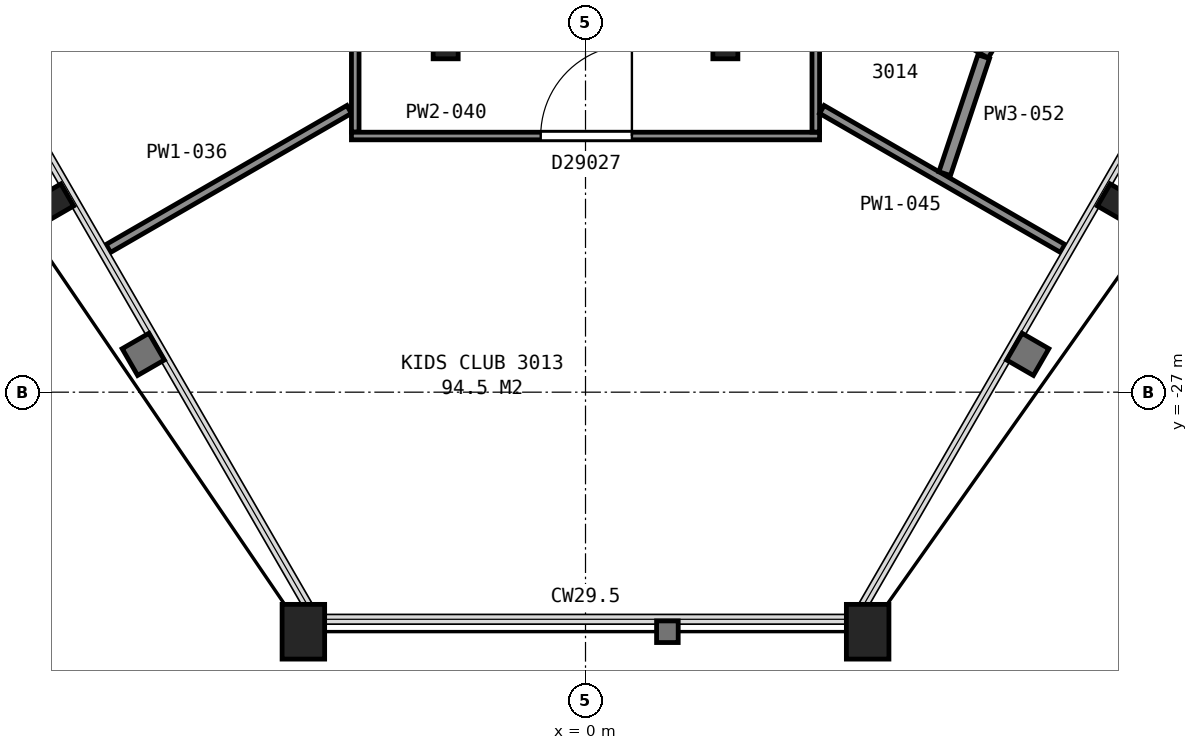
"""IFC4 building model, lengths in metres.
Left out: names, types, materials, properties, quantities, classifications, styles, units other than length and angle.
Written with IfcOpenShell. Run it as: python <this file> out.ifc"""

import sys

from ifc_helpers import new_model, si_unit, direction, frame, frame_2d, origin, origin_2d, place, context, subcontext, project, spatial, rectangle, hollow_rectangle, i_section, extrude, element, fill, save


model = new_model("IFC4")
c1 = context("Model", 3, precision=1e-05, world=origin(), true_north=direction((0.0, 1.0)))
c2 = subcontext(c1, "Body", "Model", "MODEL_VIEW")
j1 = project(units=[si_unit("LENGTHUNIT", "METRE"), si_unit("PLANEANGLEUNIT", "RADIAN")], contexts=[c1])
p1 = place(None, origin())
s1 = spatial("IfcSite", under=j1, at=p1, CompositionType="ELEMENT")
p2 = place(p1, origin())
s2 = spatial("IfcBuilding", under=s1, at=p2, CompositionType="ELEMENT")
p3 = place(p2, frame((0.0, 0.0, 125.2)))
s3 = spatial("IfcBuildingStorey", under=s2, at=p3, CompositionType="ELEMENT", Elevation=125.2)
p4 = place(p3, frame((-8.72, -23.87, 0.0), z_axis=(0.0, 0.0, 1.0), x_axis=(-0.5, 0.866025403784, 0.0)))
e1 = element("IfcColumn", 1, at=p4, inside=s3, PredefinedType="COLUMN", context=c2, shape_type="SweptSolid", body=[
    extrude(i_section(OverallWidth=0.419, OverallDepth=0.455, WebThickness=0.042, FlangeThickness=0.068, FilletRadius=0.015, at=origin_2d()), origin(), (0.0, 0.0, 1.0), 3.56),
])
for number, where, z_axis, x_axis in (
    (2, (-4.64, -30.94, 0.0), (0.0, 0.0, 1.0), (-1.0, 0.0, 0.0)),
    (3, (4.64, -30.94, 0.0), (0.0, 0.0, 1.0), (-1.0, 0.0, 0.0)),
):
    element("IfcColumn", number, at=place(p3, frame(where, z_axis=z_axis, x_axis=x_axis)), inside=s3, PredefinedType="COLUMN", context=c2, shape_type="SweptSolid", body=[
        extrude(hollow_rectangle(XDim=0.7, YDim=0.9, WallThickness=0.065, at=origin_2d()), origin(), (0.0, 0.0, 1.0), 3.525),
    ])
p5 = place(p3, frame((8.72, -23.87, 0.0), z_axis=(0.0, 0.0, 1.0), x_axis=(-0.5, -0.866025403784, 0.0)))
e4 = element("IfcColumn", 4, at=p5, inside=s3, PredefinedType="COLUMN", context=c2, shape_type="SweptSolid", body=[
    extrude(i_section(OverallWidth=0.419, OverallDepth=0.455, WebThickness=0.042, FlangeThickness=0.068, FilletRadius=0.015, at=origin_2d()), origin(), (0.0, 0.0, 1.0), 3.56),
])
for number, where, z_axis, x_axis in (
    (5, (-2.3, -21.3, 0.0), (0.0, 0.0, 1.0), (-1.0, 0.0, 0.0)),
    (6, (2.3, -21.3, 0.0), (0.0, 0.0, 1.0), (-1.0, 0.0, 0.0)),
):
    element("IfcColumn", number, at=place(p3, frame(where, z_axis=z_axis, x_axis=x_axis)), inside=s3, PredefinedType="COLUMN", context=c2, shape_type="SweptSolid", body=[
        extrude(i_section(OverallWidth=0.411, OverallDepth=0.434, WebThickness=0.036, FlangeThickness=0.057, FilletRadius=0.015, at=origin_2d()), origin(), (0.0, 0.0, 1.0), 3.6),
    ])
p6 = place(p3, frame((-7.848, -24.636, 0.0), z_axis=(0.0, 0.0, 1.0), x_axis=(0.866046917185, 0.499962735845, 0.0)))
e7 = element("IfcWall", 7, at=p6, inside=s3, PredefinedType="PARTITIONING", context=c2, shape_type="SweptSolid", body=[
    extrude(rectangle(XDim=4.573, YDim=0.15, at=frame_2d((2.287, 0.0))), origin(), (0.0, 0.0, 1.0), 2.613),
])
p7 = place(p3, frame((-3.787, -22.722, 0.0), z_axis=(0.0, 0.0, 1.0), x_axis=(0.0, 1.0, 0.0)))
e8 = element("IfcWall", 8, at=p7, inside=s3, PredefinedType="PARTITIONING", context=c2, shape_type="SweptSolid", body=[
    extrude(rectangle(XDim=7.197, YDim=0.125, at=frame_2d((3.599, 0.0))), origin(), (0.0, 0.0, 1.0), 2.613),
])
p8 = place(p7, frame((2.58, 0.0, 0.0)))
e9 = element("IfcOpeningElement", 9, at=p8, cuts=e8, PredefinedType="OPENING", context=c2, shape_type="SweptSolid", body=[
    extrude(rectangle(XDim=1.0, YDim=2.1, at=frame_2d((0.5, 1.05))), frame((0.0, 0.073, 0.0), z_axis=(0.0, -1.0, 0.0), x_axis=(1.0, 0.0, 0.0)), (0.0, 0.0, 1.0), 0.145),
])
p9 = place(p3, frame((3.85, -22.787, 0.0), z_axis=(0.0, 0.0, 1.0), x_axis=(-1.0, 0.0, 0.0)))
e10 = element("IfcWall", 10, at=p9, inside=s3, PredefinedType="PARTITIONING", context=c2, shape_type="SweptSolid", body=[
    extrude(rectangle(XDim=7.699, YDim=0.125, at=frame_2d((3.85, 0.0))), origin(), (0.0, 0.0, 1.0), 2.613),
])
p10 = place(p9, frame((3.086, 0.0, 0.0)))
e11 = element("IfcOpeningElement", 11, at=p10, cuts=e10, PredefinedType="OPENING", context=c2, shape_type="SweptSolid", body=[
    extrude(rectangle(XDim=1.5, YDim=2.1, at=frame_2d((0.75, 1.05))), frame((0.0, 0.073, 0.0), z_axis=(0.0, -1.0, 0.0), x_axis=(1.0, 0.0, 0.0)), (0.0, 0.0, 1.0), 0.145),
])
p11 = place(p3, frame((3.787, -15.525, 0.0), z_axis=(0.0, 0.0, 1.0), x_axis=(0.0, -1.0, 0.0)))
e12 = element("IfcWall", 12, at=p11, inside=s3, PredefinedType="PARTITIONING", context=c2, shape_type="SweptSolid", body=[
    extrude(rectangle(XDim=7.197, YDim=0.125, at=frame_2d((3.599, 0.0))), origin(), (0.0, 0.0, 1.0), 2.613),
])
p12 = place(p11, frame((2.177, 0.0, 0.0)))
e13 = element("IfcOpeningElement", 13, at=p12, cuts=e12, PredefinedType="OPENING", context=c2, shape_type="SweptSolid", body=[
    extrude(rectangle(XDim=0.9, YDim=2.1, at=frame_2d((0.45, 1.05))), frame((0.0, 0.073, 0.0), z_axis=(0.0, -1.0, 0.0), x_axis=(1.0, 0.0, 0.0)), (0.0, 0.0, 1.0), 0.145),
])
p13 = place(p3, frame((3.887, -22.35, 0.0), z_axis=(0.0, 0.0, 1.0), x_axis=(0.866046917185, -0.499962735845, 0.0)))
e14 = element("IfcWall", 14, at=p13, inside=s3, PredefinedType="PARTITIONING", context=c2, shape_type="SweptSolid", body=[
    extrude(rectangle(XDim=4.573, YDim=0.15, at=frame_2d((2.287, 0.0))), origin(), (0.0, 0.0, 1.0), 2.613),
])
p14 = place(p3, frame((6.674, -21.418, 0.0), z_axis=(0.0, 0.0, 1.0), x_axis=(-0.866105631149, 0.499861016376, 0.0)))
e15 = element("IfcWall", 15, at=p14, inside=s3, PredefinedType="PARTITIONING", context=c2, shape_type="SweptSolid", body=[
    extrude(rectangle(XDim=3.203, YDim=0.2, at=frame_2d((1.602, 0.0))), origin(), (0.0, 0.0, 1.0), 2.613),
])
p15 = place(p14, frame((1.333, 0.0, 0.0)))
e16 = element("IfcOpeningElement", 16, at=p15, cuts=e15, PredefinedType="OPENING", context=c2, shape_type="SweptSolid", body=[
    extrude(rectangle(XDim=0.8, YDim=2.1, at=frame_2d((0.4, 1.05))), frame((0.0, 0.11, 0.0), z_axis=(0.0, -1.0, 0.0), x_axis=(1.0, 0.0, 0.0)), (0.0, 0.0, 1.0), 0.22),
])
p16 = place(p3, frame((5.907, -23.406, 0.0), z_axis=(0.0, 0.0, 1.0), x_axis=(0.316661020634, 0.948538769904, 0.0)))
e17 = element("IfcWall", 17, at=p16, inside=s3, PredefinedType="PARTITIONING", context=c2, shape_type="SweptSolid", body=[
    extrude(rectangle(XDim=2.029, YDim=0.2, at=frame_2d((1.014, 0.0))), origin(), (0.0, 0.0, 1.0), 2.613),
])
p17 = place(p10, origin())
e18 = element("IfcDoor", 18, at=p17, inside=s3, OperationType="DOUBLE_DOOR_SINGLE_SWING", PredefinedType="DOOR", context=c2, shape_type="SweptSolid", body=[
    extrude(rectangle(XDim=1.5, YDim=2.1, at=frame_2d((0.75, 1.05))), frame((0.0, 0.025, 0.0), z_axis=(0.0, -1.0, 0.0), x_axis=(1.0, 0.0, 0.0)), (0.0, 0.0, 1.0), 0.05),
])
fill(e11, e18)
save(model, sys.argv[1])
